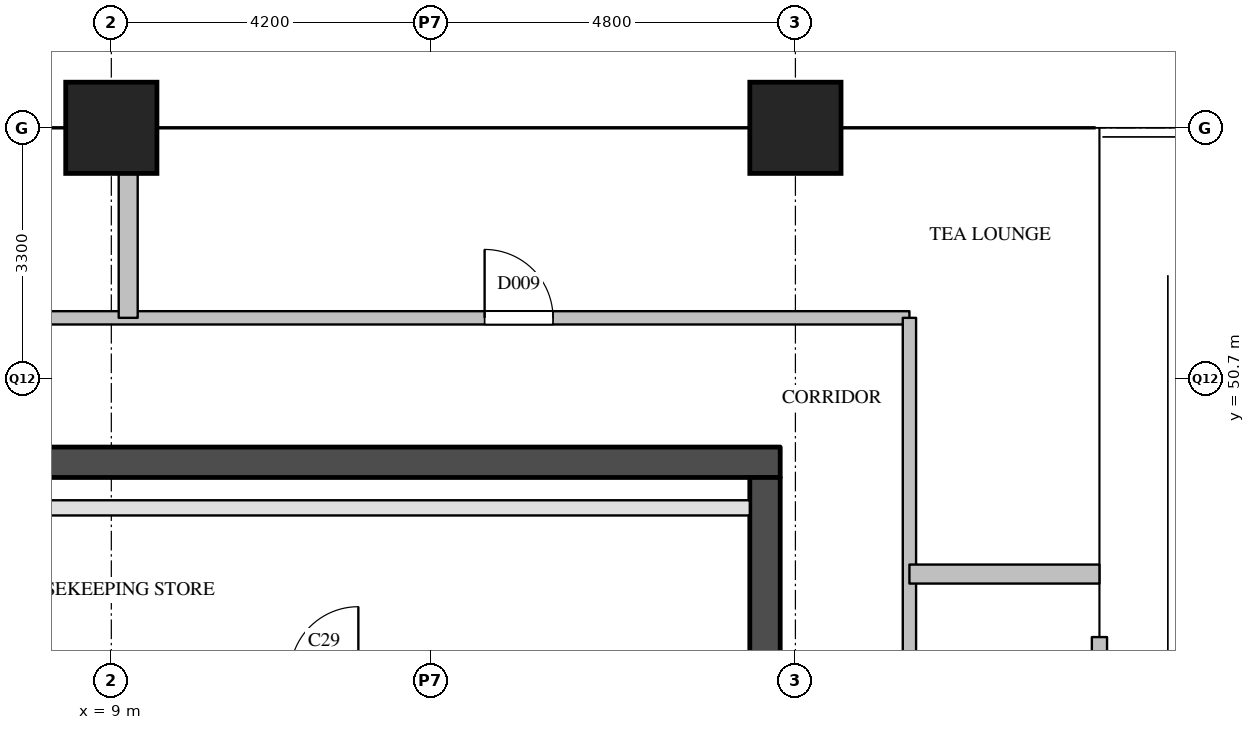
"""IFC4 building model, lengths in metres.
Left out: names, types, materials, properties, quantities, classifications, styles, units other than length and angle.
Written with IfcOpenShell. Run it as: python <this file> out.ifc"""

import sys

from ifc_helpers import new_model, si_unit, direction, frame, frame_2d, origin, origin_2d, place, context, subcontext, project, spatial, rectangle, extrude, element, fill, save


model = new_model("IFC4")
c1 = context("Model", 3, precision=1e-05, world=origin(), true_north=direction((0.0, 1.0)))
c2 = subcontext(c1, "Body", "Model", "MODEL_VIEW")
j1 = project(units=[si_unit("LENGTHUNIT", "METRE"), si_unit("PLANEANGLEUNIT", "RADIAN")], contexts=[c1])
p1 = place(None, origin())
s1 = spatial("IfcSite", under=j1, at=p1, CompositionType="ELEMENT")
p2 = place(p1, origin())
s2 = spatial("IfcBuilding", under=s1, at=p2, CompositionType="ELEMENT")
p3 = place(p2, frame((0.0, 0.0, 203.3)))
s3 = spatial("IfcBuildingStorey", under=s2, at=p3, CompositionType="ELEMENT", Elevation=203.3)
for number, where, z_axis, x_axis in (
    (1, (9.0, 54.0, 0.0), (0.0, 0.0, 1.0), (1.0, 0.0, 0.0)),
    (2, (18.0, 54.0, 0.0), (0.0, 0.0, 1.0), (1.0, 0.0, 0.0)),
):
    element("IfcColumn", number, at=place(p3, frame(where, z_axis=z_axis, x_axis=x_axis)), inside=s3, PredefinedType="COLUMN", context=c2, shape_type="SweptSolid", body=[
        extrude(rectangle(XDim=1.2, YDim=1.2, at=origin_2d()), origin(), (0.0, 0.0, 1.0), 3.9),
    ])
p4 = place(p3, frame((22.0, 42.8, 0.0), z_axis=(0.0, 0.0, 1.0), x_axis=(0.0, 1.0, 0.0)))
e3 = element("IfcWall", 3, at=p4, inside=s3, PredefinedType="SOLIDWALL", context=c2, shape_type="SweptSolid", body=[
    extrude(rectangle(XDim=4.5, YDim=0.2, at=frame_2d((2.25, 0.0))), origin(), (0.0, 0.0, 1.0), 2.6),
])
p5 = place(p4, frame((1.5, 0.0, 0.0)))
e4 = element("IfcOpeningElement", 4, at=p5, cuts=e3, PredefinedType="OPENING", context=c2, shape_type="SweptSolid", body=[
    extrude(rectangle(XDim=1.5, YDim=2.1, at=frame_2d((0.75, 1.05))), frame((0.0, 0.11, 0.0), z_axis=(0.0, -1.0, 0.0), x_axis=(1.0, 0.0, 0.0)), (0.0, 0.0, 1.0), 0.22),
])
p6 = place(p3, frame((5.8, 49.6, 0.0), z_axis=(0.0, 0.0, 1.0), x_axis=(1.0, 0.0, 0.0)))
e5 = element("IfcWall", 5, at=p6, inside=s3, PredefinedType="SHEAR", context=c2, shape_type="SweptSolid", body=[
    extrude(rectangle(XDim=12.0, YDim=0.4, at=frame_2d((6.0, 0.0))), origin(), (0.0, 0.0, 1.0), 3.6),
])
p7 = place(p3, frame((17.6, 29.1, 0.0), z_axis=(0.0, 0.0, 1.0), x_axis=(0.0, 1.0, 0.0)))
e6 = element("IfcWall", 6, at=p7, inside=s3, PredefinedType="SHEAR", context=c2, shape_type="SweptSolid", body=[
    extrude(rectangle(XDim=20.3, YDim=0.4, at=frame_2d((10.15, 0.0))), origin(), (0.0, 0.0, 1.0), 3.6),
])
p8 = place(p7, frame((1.25, 0.0, 0.0)))
e7 = element("IfcOpeningElement", 7, at=p8, cuts=e6, PredefinedType="OPENING", context=c2, shape_type="SweptSolid", body=[
    extrude(rectangle(XDim=0.7, YDim=2.1, at=frame_2d((0.35, 1.05))), frame((0.0, 0.21, 0.0), z_axis=(0.0, -1.0, 0.0), x_axis=(1.0, 0.0, 0.0)), (0.0, 0.0, 1.0), 0.42),
])
p9 = place(p7, frame((7.05, 0.0, 0.0)))
e8 = element("IfcOpeningElement", 8, at=p9, cuts=e6, PredefinedType="OPENING", context=c2, shape_type="SweptSolid", body=[
    extrude(rectangle(XDim=0.7, YDim=2.1, at=frame_2d((0.35, 1.05))), frame((0.0, 0.21, 0.0), z_axis=(0.0, -1.0, 0.0), x_axis=(1.0, 0.0, 0.0)), (0.0, 0.0, 1.0), 0.42),
])
p10 = place(p7, frame((3.6, 0.0, 0.0)))
e9 = element("IfcOpeningElement", 9, at=p10, cuts=e6, PredefinedType="OPENING", context=c2, shape_type="SweptSolid", body=[
    extrude(rectangle(XDim=1.8, YDim=2.1, at=frame_2d((0.9, 1.05))), frame((0.0, 0.21, 0.0), z_axis=(0.0, -1.0, 0.0), x_axis=(1.0, 0.0, 0.0)), (0.0, 0.0, 1.0), 0.42),
])
p11 = place(p3, frame((6.2, 49.0, 0.0), z_axis=(0.0, 0.0, 1.0), x_axis=(1.0, 0.0, 0.0)))
e10 = element("IfcWall", 10, at=p11, inside=s3, PredefinedType="PARTITIONING", context=c2, shape_type="SweptSolid", body=[
    extrude(rectangle(XDim=11.2, YDim=0.2, at=frame_2d((5.6, 0.0))), origin(), (0.0, 0.0, 1.0), 3.6),
])
p12 = place(p3, frame((4.1, 51.5, 0.0), z_axis=(0.0, 0.0, 1.0), x_axis=(1.0, 0.0, 0.0)))
e11 = element("IfcWall", 11, at=p12, inside=s3, PredefinedType="PARTITIONING", context=c2, shape_type="SweptSolid", body=[
    extrude(rectangle(XDim=15.4, YDim=0.175, at=frame_2d((7.7, 0.0))), origin(), (0.0, 0.0, 1.0), 3.6),
])
p13 = place(p12, frame((9.811, 0.0, 0.0)))
e12 = element("IfcOpeningElement", 12, at=p13, cuts=e11, PredefinedType="OPENING", context=c2, shape_type="SweptSolid", body=[
    extrude(rectangle(XDim=0.9, YDim=2.1, at=frame_2d((0.45, 1.05))), frame((0.0, 0.097, 0.0), z_axis=(0.0, -1.0, 0.0), x_axis=(1.0, 0.0, 0.0)), (0.0, 0.0, 1.0), 0.195),
])
p14 = place(p3, frame((19.5, 36.75, 0.0), z_axis=(0.0, 0.0, 1.0), x_axis=(0.0, 1.0, 0.0)))
e13 = element("IfcWall", 13, at=p14, inside=s3, PredefinedType="PARTITIONING", context=c2, shape_type="SweptSolid", body=[
    extrude(rectangle(XDim=14.75, YDim=0.175, at=frame_2d((7.375, 0.0))), origin(), (0.0, 0.0, 1.0), 3.6),
])
p15 = place(p14, frame((5.239, 0.0, 0.0)))
e14 = element("IfcOpeningElement", 14, at=p15, cuts=e13, PredefinedType="OPENING", context=c2, shape_type="SweptSolid", body=[
    extrude(rectangle(XDim=0.9, YDim=2.1, at=frame_2d((0.45, 1.05))), frame((0.0, 0.097, 0.0), z_axis=(0.0, -1.0, 0.0), x_axis=(1.0, 0.0, 0.0)), (0.0, 0.0, 1.0), 0.195),
])
for number, where, z_axis, x_axis in (
    (15, (19.5, 48.129, 0.0), (0.0, 0.0, 1.0), (1.0, 0.0, 0.0)),
    (16, (9.222, 51.5, 0.0), (0.0, 0.0, 1.0), (0.0, 1.0, 0.0)),
):
    element("IfcWall", number, at=place(p3, frame(where, z_axis=z_axis, x_axis=x_axis)), inside=s3, PredefinedType="PARTITIONING", context=c2, shape_type="SweptSolid", body=[
        extrude(rectangle(XDim=2.5, YDim=0.25, at=frame_2d((1.25, 0.0))), origin(), (0.0, 0.0, 1.0), 3.6),
    ])
p16 = place(p13, origin())
e17 = element("IfcDoor", 17, at=p16, inside=s3, OperationType="SINGLE_SWING_LEFT", PredefinedType="DOOR", context=c2, shape_type="SweptSolid", body=[
    extrude(rectangle(XDim=0.9, YDim=2.1, at=frame_2d((0.45, 1.05))), frame((0.0, 0.025, 0.0), z_axis=(0.0, -1.0, 0.0), x_axis=(1.0, 0.0, 0.0)), (0.0, 0.0, 1.0), 0.05),
])
fill(e12, e17)
save(model, sys.argv[1])
